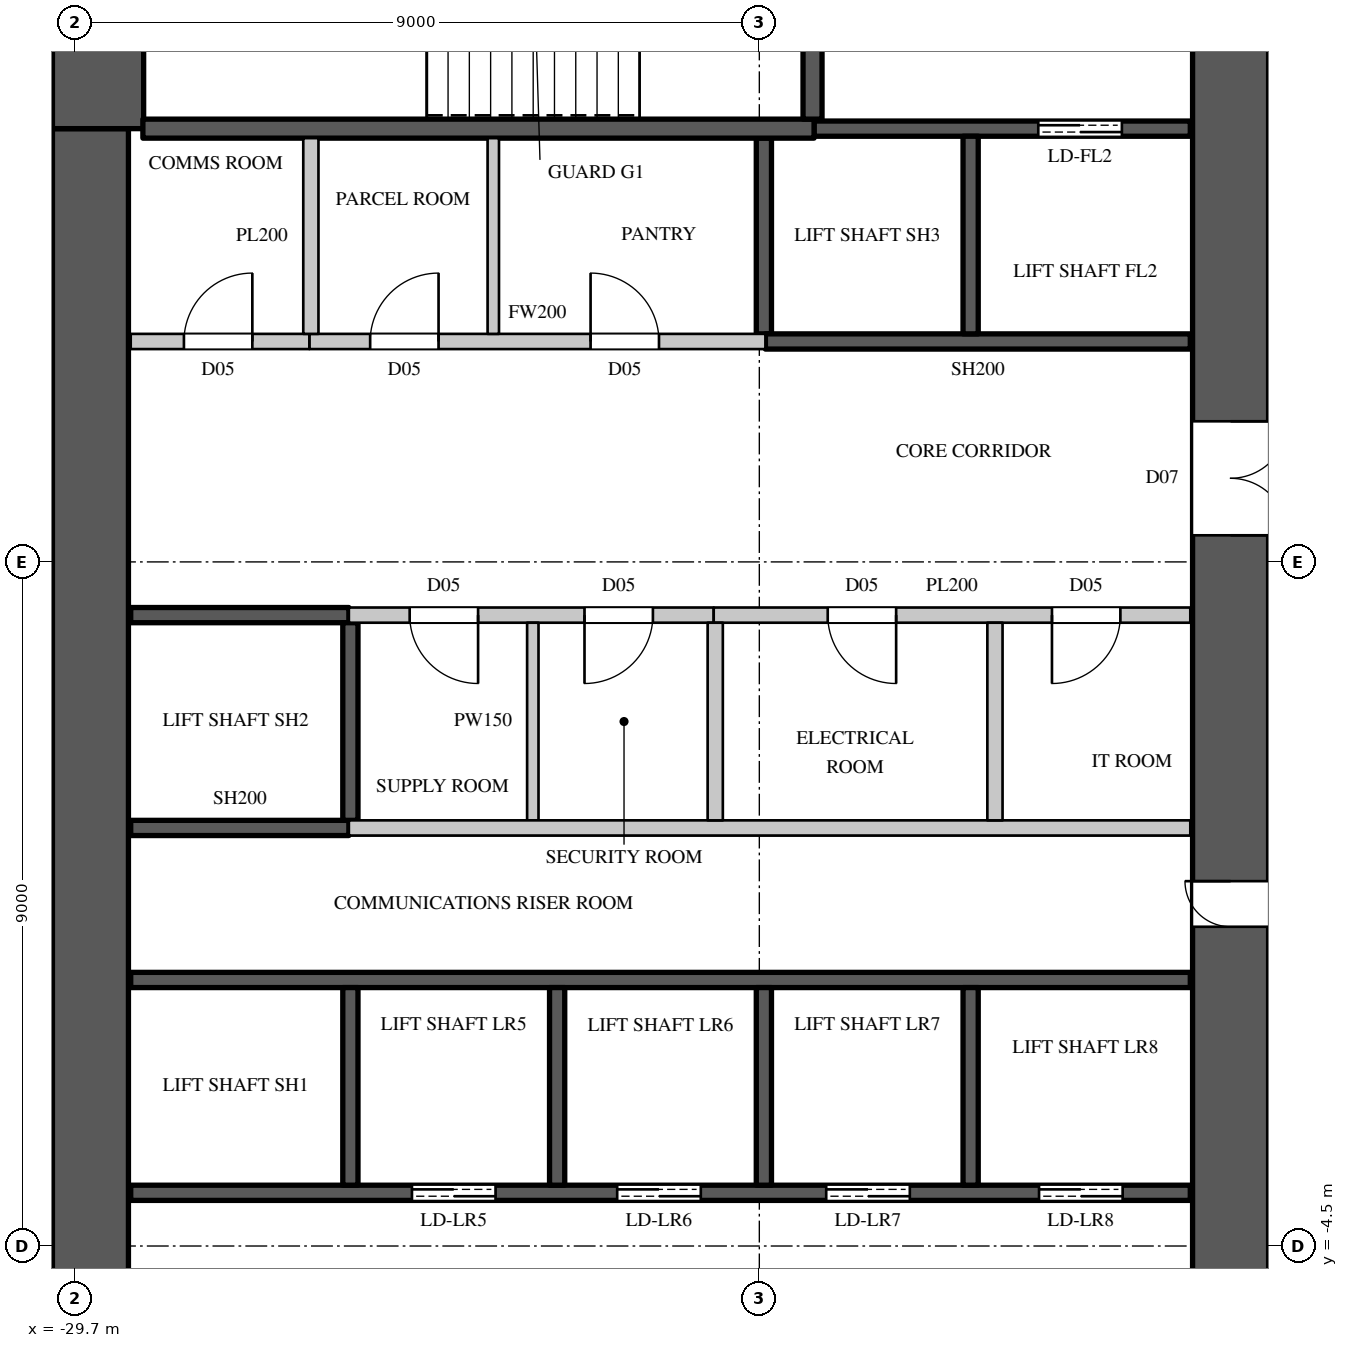
"""IFC4 building model, lengths in metres.
Left out: names, types, materials, properties, quantities, classifications, styles, units other than length and angle.
Written with IfcOpenShell. Run it as: python <this file> out.ifc"""

import sys

from ifc_helpers import new_model, si_unit, direction, frame, frame_2d, origin, place, context, subcontext, project, spatial, rectangle, extrude, element, fill, save


model = new_model("IFC4")
c1 = context("Model", 3, precision=1e-05, world=origin(), true_north=direction((0.0, 1.0)))
c2 = subcontext(c1, "Body", "Model", "MODEL_VIEW")
j1 = project(units=[si_unit("LENGTHUNIT", "METRE"), si_unit("PLANEANGLEUNIT", "RADIAN")], contexts=[c1])
p1 = place(None, origin())
s1 = spatial("IfcSite", under=j1, at=p1, CompositionType="ELEMENT")
p2 = place(p1, origin())
s2 = spatial("IfcBuilding", under=s1, at=p2, CompositionType="ELEMENT")
p3 = place(p2, frame((0.0, 0.0, 120.3)))
s3 = spatial("IfcBuildingStorey", under=s2, at=p3, CompositionType="ELEMENT", Elevation=120.3)
p4 = place(p3, frame((-14.5, -14.8, 0.0), z_axis=(0.0, 0.0, 1.0), x_axis=(0.0, 1.0, 0.0)))
e1 = element("IfcWall", 1, at=p4, inside=s3, PredefinedType="SHEAR", context=c2, shape_type="SweptSolid", body=[
    extrude(rectangle(XDim=29.6, YDim=1.0, at=frame_2d((14.8, 0.0))), origin(), (0.0, 0.0, 1.0), 3.6),
])
p5 = place(p4, frame((8.45, 0.0, 0.0)))
e2 = element("IfcOpeningElement", 2, at=p5, cuts=e1, PredefinedType="OPENING", context=c2, shape_type="SweptSolid", body=[
    extrude(rectangle(XDim=1.5, YDim=2.4, at=frame_2d((0.75, 1.2))), frame((0.0, 0.51, 0.0), z_axis=(0.0, -1.0, 0.0), x_axis=(1.0, 0.0, 0.0)), (0.0, 0.0, 1.0), 1.02),
])
p6 = place(p4, frame((19.65, 0.0, 0.0)))
e3 = element("IfcOpeningElement", 3, at=p6, cuts=e1, PredefinedType="OPENING", context=c2, shape_type="SweptSolid", body=[
    extrude(rectangle(XDim=1.5, YDim=2.4, at=frame_2d((0.75, 1.2))), frame((0.0, 0.51, 0.0), z_axis=(0.0, -1.0, 0.0), x_axis=(1.0, 0.0, 0.0)), (0.0, 0.0, 1.0), 1.02),
])
p7 = place(p4, frame((14.5, 0.0, 0.0)))
e4 = element("IfcOpeningElement", 4, at=p7, cuts=e1, PredefinedType="OPENING", context=c2, shape_type="SweptSolid", body=[
    extrude(rectangle(XDim=0.6, YDim=2.0, at=frame_2d((0.3, 1.0))), frame((0.0, 0.51, 0.0), z_axis=(0.0, -1.0, 0.0), x_axis=(1.0, 0.0, 0.0)), (0.0, 0.0, 1.0), 1.02),
])
p8 = place(p3, frame((-29.5, -10.2, 0.0), z_axis=(0.0, 0.0, 1.0), x_axis=(0.0, 1.0, 0.0)))
e5 = element("IfcWall", 5, at=p8, inside=s3, PredefinedType="SHEAR", context=c2, shape_type="SweptSolid", body=[
    extrude(rectangle(XDim=20.4, YDim=1.0, at=frame_2d((10.2, 0.0))), origin(), (0.0, 0.0, 1.0), 3.6),
])
p9 = place(p3, frame((-29.4, 10.2, 0.0), z_axis=(0.0, 0.0, 1.0), x_axis=(0.0, 1.0, 0.0)))
e6 = element("IfcWall", 6, at=p9, inside=s3, PredefinedType="SHEAR", context=c2, shape_type="SweptSolid", body=[
    extrude(rectangle(XDim=4.6, YDim=1.2, at=frame_2d((2.3, 0.0))), origin(), (0.0, 0.0, 1.0), 3.6),
])
p10 = place(p3, frame((-26.62, 7.4, 0.0), z_axis=(0.0, 0.0, 1.0), x_axis=(1.0, 0.0, 0.0)))
e7 = element("IfcWall", 7, at=p10, inside=s3, PredefinedType="PARTITIONING", context=c2, shape_type="SweptSolid", body=[
    extrude(rectangle(XDim=6.0, YDim=0.2, at=frame_2d((3.0, 0.0))), origin(), (0.0, 0.0, 1.0), 3.3),
])
p11 = place(p10, frame((0.8, 0.0, 0.0)))
e8 = element("IfcOpeningElement", 8, at=p11, cuts=e7, PredefinedType="OPENING", context=c2, shape_type="SweptSolid", body=[
    extrude(rectangle(XDim=0.9, YDim=2.2, at=frame_2d((0.45, 1.1))), frame((0.0, 0.11, 0.0), z_axis=(0.0, -1.0, 0.0), x_axis=(1.0, 0.0, 0.0)), (0.0, 0.0, 1.0), 0.22),
])
p12 = place(p10, frame((3.7, 0.0, 0.0)))
e9 = element("IfcOpeningElement", 9, at=p12, cuts=e7, PredefinedType="OPENING", context=c2, shape_type="SweptSolid", body=[
    extrude(rectangle(XDim=0.9, YDim=2.2, at=frame_2d((0.45, 1.1))), frame((0.0, 0.11, 0.0), z_axis=(0.0, -1.0, 0.0), x_axis=(1.0, 0.0, 0.0)), (0.0, 0.0, 1.0), 0.22),
])
p13 = place(p3, frame((-26.1, 3.8, 0.0), z_axis=(0.0, 0.0, 1.0), x_axis=(1.0, 0.0, 0.0)))
e10 = element("IfcWall", 10, at=p13, inside=s3, PredefinedType="PARTITIONING", context=c2, shape_type="SweptSolid", body=[
    extrude(rectangle(XDim=4.8, YDim=0.2, at=frame_2d((2.4, 0.0))), origin(), (0.0, 0.0, 1.0), 3.3),
])
p14 = place(p13, frame((0.8, 0.0, 0.0)))
e11 = element("IfcOpeningElement", 11, at=p14, cuts=e10, PredefinedType="OPENING", context=c2, shape_type="SweptSolid", body=[
    extrude(rectangle(XDim=0.9, YDim=2.2, at=frame_2d((0.45, 1.1))), frame((0.0, 0.11, 0.0), z_axis=(0.0, -1.0, 0.0), x_axis=(1.0, 0.0, 0.0)), (0.0, 0.0, 1.0), 0.22),
])
p15 = place(p13, frame((3.1, 0.0, 0.0)))
e12 = element("IfcOpeningElement", 12, at=p15, cuts=e10, PredefinedType="OPENING", context=c2, shape_type="SweptSolid", body=[
    extrude(rectangle(XDim=0.9, YDim=2.2, at=frame_2d((0.45, 1.1))), frame((0.0, 0.11, 0.0), z_axis=(0.0, -1.0, 0.0), x_axis=(1.0, 0.0, 0.0)), (0.0, 0.0, 1.0), 0.22),
])
p16 = place(p3, frame((-24.2, 7.5, 0.0), z_axis=(0.0, 0.0, 1.0), x_axis=(0.0, 1.0, 0.0)))
e13 = element("IfcWall", 13, at=p16, inside=s3, PredefinedType="PARTITIONING", context=c2, shape_type="SweptSolid", body=[
    extrude(rectangle(XDim=2.575, YDim=0.15, at=frame_2d((1.288, 0.0))), origin(), (0.0, 0.0, 1.0), 3.3),
])
p17 = place(p3, frame((-23.68, 1.1, 0.0), z_axis=(0.0, 0.0, 1.0), x_axis=(0.0, 1.0, 0.0)))
e14 = element("IfcWall", 14, at=p17, inside=s3, PredefinedType="PARTITIONING", context=c2, shape_type="SweptSolid", body=[
    extrude(rectangle(XDim=2.6, YDim=0.15, at=frame_2d((1.3, 0.0))), origin(), (0.0, 0.0, 1.0), 3.3),
])
p18 = place(p3, frame((-28.97, 7.4, 0.0), z_axis=(0.0, 0.0, 1.0), x_axis=(1.0, 0.0, 0.0)))
e15 = element("IfcWall", 15, at=p18, inside=s3, PredefinedType="PARTITIONING", context=c2, shape_type="SweptSolid", body=[
    extrude(rectangle(XDim=2.35, YDim=0.2, at=frame_2d((1.175, 0.0))), origin(), (0.0, 0.0, 1.0), 3.3),
])
p19 = place(p18, frame((0.7, 0.0, 0.0)))
e16 = element("IfcOpeningElement", 16, at=p19, cuts=e15, PredefinedType="OPENING", context=c2, shape_type="SweptSolid", body=[
    extrude(rectangle(XDim=0.9, YDim=2.2, at=frame_2d((0.45, 1.1))), frame((0.0, 0.11, 0.0), z_axis=(0.0, -1.0, 0.0), x_axis=(1.0, 0.0, 0.0)), (0.0, 0.0, 1.0), 0.22),
])
p20 = place(p3, frame((-26.6, 7.5, 0.0), z_axis=(0.0, 0.0, 1.0), x_axis=(0.0, 1.0, 0.0)))
e17 = element("IfcWall", 17, at=p20, inside=s3, PredefinedType="PARTITIONING", context=c2, shape_type="SweptSolid", body=[
    extrude(rectangle(XDim=2.575, YDim=0.2, at=frame_2d((1.288, 0.0))), origin(), (0.0, 0.0, 1.0), 3.3),
])
p21 = place(p3, frame((-26.1, 1.0, 0.0), z_axis=(0.0, 0.0, 1.0), x_axis=(1.0, 0.0, 0.0)))
e18 = element("IfcWall", 18, at=p21, inside=s3, PredefinedType="PARTITIONING", context=c2, shape_type="SweptSolid", body=[
    extrude(rectangle(XDim=11.07, YDim=0.2, at=frame_2d((5.535, 0.0))), origin(), (0.0, 0.0, 1.0), 3.3),
])
p22 = place(p3, frame((-21.3, 3.8, 0.0), z_axis=(0.0, 0.0, 1.0), x_axis=(1.0, 0.0, 0.0)))
e19 = element("IfcWall", 19, at=p22, inside=s3, PredefinedType="PARTITIONING", context=c2, shape_type="SweptSolid", body=[
    extrude(rectangle(XDim=6.27, YDim=0.2, at=frame_2d((3.135, 0.0))), origin(), (0.0, 0.0, 1.0), 3.3),
])
p23 = place(p22, frame((1.5, 0.0, 0.0)))
e20 = element("IfcOpeningElement", 20, at=p23, cuts=e19, PredefinedType="OPENING", context=c2, shape_type="SweptSolid", body=[
    extrude(rectangle(XDim=0.9, YDim=2.2, at=frame_2d((0.45, 1.1))), frame((0.0, 0.11, 0.0), z_axis=(0.0, -1.0, 0.0), x_axis=(1.0, 0.0, 0.0)), (0.0, 0.0, 1.0), 0.22),
])
p24 = place(p22, frame((4.45, 0.0, 0.0)))
e21 = element("IfcOpeningElement", 21, at=p24, cuts=e19, PredefinedType="OPENING", context=c2, shape_type="SweptSolid", body=[
    extrude(rectangle(XDim=0.9, YDim=2.2, at=frame_2d((0.45, 1.1))), frame((0.0, 0.11, 0.0), z_axis=(0.0, -1.0, 0.0), x_axis=(1.0, 0.0, 0.0)), (0.0, 0.0, 1.0), 0.22),
])
for number, where, z_axis, x_axis in (
    (22, (-21.28, 1.1, 0.0), (0.0, 0.0, 1.0), (0.0, 1.0, 0.0)),
    (23, (-17.6, 1.1, 0.0), (0.0, 0.0, 1.0), (0.0, 1.0, 0.0)),
):
    element("IfcWall", number, at=place(p3, frame(where, z_axis=z_axis, x_axis=x_axis)), inside=s3, PredefinedType="PARTITIONING", context=c2, shape_type="SweptSolid", body=[
        extrude(rectangle(XDim=2.6, YDim=0.2, at=frame_2d((1.3, 0.0))), origin(), (0.0, 0.0, 1.0), 3.3),
    ])
p25 = place(p3, frame((-28.97, -3.8, 0.0), z_axis=(0.0, 0.0, 1.0), x_axis=(1.0, 0.0, 0.0)))
e24 = element("IfcWall", 24, at=p25, inside=s3, PredefinedType="SHEAR", context=c2, shape_type="SweptSolid", body=[
    extrude(rectangle(XDim=13.94, YDim=0.2, at=frame_2d((6.97, 0.0))), origin(), (0.0, 0.0, 1.0), 3.3),
])
p26 = place(p25, frame((3.7, 0.0, 0.0)))
e25 = element("IfcOpeningElement", 25, at=p26, cuts=e24, PredefinedType="OPENING", context=c2, shape_type="SweptSolid", body=[
    extrude(rectangle(XDim=1.1, YDim=2.2, at=frame_2d((0.55, 1.1))), frame((0.0, 0.11, 0.0), z_axis=(0.0, -1.0, 0.0), x_axis=(1.0, 0.0, 0.0)), (0.0, 0.0, 1.0), 0.22),
])
p27 = place(p25, frame((6.4, 0.0, 0.0)))
e26 = element("IfcOpeningElement", 26, at=p27, cuts=e24, PredefinedType="OPENING", context=c2, shape_type="SweptSolid", body=[
    extrude(rectangle(XDim=1.1, YDim=2.2, at=frame_2d((0.55, 1.1))), frame((0.0, 0.11, 0.0), z_axis=(0.0, -1.0, 0.0), x_axis=(1.0, 0.0, 0.0)), (0.0, 0.0, 1.0), 0.22),
])
p28 = place(p25, frame((9.15, 0.0, 0.0)))
e27 = element("IfcOpeningElement", 27, at=p28, cuts=e24, PredefinedType="OPENING", context=c2, shape_type="SweptSolid", body=[
    extrude(rectangle(XDim=1.1, YDim=2.2, at=frame_2d((0.55, 1.1))), frame((0.0, 0.11, 0.0), z_axis=(0.0, -1.0, 0.0), x_axis=(1.0, 0.0, 0.0)), (0.0, 0.0, 1.0), 0.22),
])
p29 = place(p25, frame((11.95, 0.0, 0.0)))
e28 = element("IfcOpeningElement", 28, at=p29, cuts=e24, PredefinedType="OPENING", context=c2, shape_type="SweptSolid", body=[
    extrude(rectangle(XDim=1.1, YDim=2.2, at=frame_2d((0.55, 1.1))), frame((0.0, 0.11, 0.0), z_axis=(0.0, -1.0, 0.0), x_axis=(1.0, 0.0, 0.0)), (0.0, 0.0, 1.0), 0.22),
])
p30 = place(p3, frame((-28.97, -1.0, 0.0), z_axis=(0.0, 0.0, 1.0), x_axis=(1.0, 0.0, 0.0)))
e29 = element("IfcWall", 29, at=p30, inside=s3, PredefinedType="SHEAR", context=c2, shape_type="SweptSolid", body=[
    extrude(rectangle(XDim=13.94, YDim=0.2, at=frame_2d((6.97, 0.0))), origin(), (0.0, 0.0, 1.0), 3.3),
])
for number, where, z_axis, x_axis in (
    (30, (-28.97, 1.0, 0.0), (0.0, 0.0, 1.0), (1.0, 0.0, 0.0)),
    (31, (-28.97, 3.8, 0.0), (0.0, 0.0, 1.0), (1.0, 0.0, 0.0)),
):
    element("IfcWall", number, at=place(p3, frame(where, z_axis=z_axis, x_axis=x_axis)), inside=s3, PredefinedType="SHEAR", context=c2, shape_type="SweptSolid", body=[
        extrude(rectangle(XDim=2.87, YDim=0.2, at=frame_2d((1.435, 0.0))), origin(), (0.0, 0.0, 1.0), 3.3),
    ])
p31 = place(p3, frame((-26.08, -3.7, 0.0), z_axis=(0.0, 0.0, 1.0), x_axis=(0.0, 1.0, 0.0)))
e32 = element("IfcWall", 32, at=p31, inside=s3, PredefinedType="SHEAR", context=c2, shape_type="SweptSolid", body=[
    extrude(rectangle(XDim=2.6, YDim=0.2, at=frame_2d((1.3, 0.0))), origin(), (0.0, 0.0, 1.0), 3.6),
])
p32 = place(p3, frame((-26.08, 1.1, 0.0), z_axis=(0.0, 0.0, 1.0), x_axis=(0.0, 1.0, 0.0)))
e33 = element("IfcWall", 33, at=p32, inside=s3, PredefinedType="SHEAR", context=c2, shape_type="SweptSolid", body=[
    extrude(rectangle(XDim=2.6, YDim=0.2, at=frame_2d((1.3, 0.0))), origin(), (0.0, 0.0, 1.0), 3.3),
])
for number, where, z_axis, x_axis in (
    (34, (-23.36, -3.7, 0.0), (0.0, 0.0, 1.0), (0.0, 1.0, 0.0)),
    (35, (-20.64, -3.7, 0.0), (0.0, 0.0, 1.0), (0.0, 1.0, 0.0)),
):
    element("IfcWall", number, at=place(p3, frame(where, z_axis=z_axis, x_axis=x_axis)), inside=s3, PredefinedType="SHEAR", context=c2, shape_type="SweptSolid", body=[
        extrude(rectangle(XDim=2.6, YDim=0.2, at=frame_2d((1.3, 0.0))), origin(), (0.0, 0.0, 1.0), 3.6),
    ])
p33 = place(p3, frame((-20.64, 7.5, 0.0), z_axis=(0.0, 0.0, 1.0), x_axis=(0.0, 1.0, 0.0)))
e36 = element("IfcWall", 36, at=p33, inside=s3, PredefinedType="SHEAR", context=c2, shape_type="SweptSolid", body=[
    extrude(rectangle(XDim=2.575, YDim=0.2, at=frame_2d((1.288, 0.0))), origin(), (0.0, 0.0, 1.0), 3.3),
])
p34 = place(p3, frame((-20.62, 7.4, 0.0), z_axis=(0.0, 0.0, 1.0), x_axis=(1.0, 0.0, 0.0)))
e37 = element("IfcWall", 37, at=p34, inside=s3, PredefinedType="SHEAR", context=c2, shape_type="SweptSolid", body=[
    extrude(rectangle(XDim=5.59, YDim=0.2, at=frame_2d((2.795, 0.0))), origin(), (0.0, 0.0, 1.0), 3.3),
])
p35 = place(p3, frame((-19.98, 10.2, 0.0), z_axis=(0.0, 0.0, 1.0), x_axis=(1.0, 0.0, 0.0)))
e38 = element("IfcWall", 38, at=p35, inside=s3, PredefinedType="SHEAR", context=c2, shape_type="SweptSolid", body=[
    extrude(rectangle(XDim=4.95, YDim=0.2, at=frame_2d((2.475, 0.0))), origin(), (0.0, 0.0, 1.0), 3.3),
])
p36 = place(p35, frame((2.95, 0.0, 0.0)))
e39 = element("IfcOpeningElement", 39, at=p36, cuts=e38, PredefinedType="OPENING", context=c2, shape_type="SweptSolid", body=[
    extrude(rectangle(XDim=1.1, YDim=2.2, at=frame_2d((0.55, 1.1))), frame((0.0, 0.11, 0.0), z_axis=(0.0, -1.0, 0.0), x_axis=(1.0, 0.0, 0.0)), (0.0, 0.0, 1.0), 0.22),
])
p37 = place(p3, frame((-17.92, -3.7, 0.0), z_axis=(0.0, 0.0, 1.0), x_axis=(0.0, 1.0, 0.0)))
e40 = element("IfcWall", 40, at=p37, inside=s3, PredefinedType="SHEAR", context=c2, shape_type="SweptSolid", body=[
    extrude(rectangle(XDim=2.6, YDim=0.2, at=frame_2d((1.3, 0.0))), origin(), (0.0, 0.0, 1.0), 3.6),
])
p38 = place(p3, frame((-17.92, 7.5, 0.0), z_axis=(0.0, 0.0, 1.0), x_axis=(0.0, 1.0, 0.0)))
e41 = element("IfcWall", 41, at=p38, inside=s3, PredefinedType="SHEAR", context=c2, shape_type="SweptSolid", body=[
    extrude(rectangle(XDim=2.6, YDim=0.2, at=frame_2d((1.3, 0.0))), origin(), (0.0, 0.0, 1.0), 3.6),
])
p39 = place(p3, frame((-28.81, 10.2, 0.0), z_axis=(0.0, 0.0, 1.0), x_axis=(1.0, 0.0, 0.0)))
e42 = element("IfcWall", 42, at=p39, inside=s3, PredefinedType="SHEAR", context=c2, shape_type="SweptSolid", body=[
    extrude(rectangle(XDim=8.83, YDim=0.25, at=frame_2d((4.415, 0.0))), origin(), (0.0, 0.0, 1.0), 3.3),
])
p40 = place(p3, frame((-20.0, 10.325, 0.0), z_axis=(0.0, 0.0, 1.0), x_axis=(0.0, 1.0, 0.0)))
e43 = element("IfcWall", 43, at=p40, inside=s3, PredefinedType="SHEAR", context=c2, shape_type="SweptSolid", body=[
    extrude(rectangle(XDim=4.445, YDim=0.25, at=frame_2d((2.223, 0.0))), origin(), (0.0, 0.0, 1.0), 3.3),
])
p41 = place(p40, frame((1.65, 0.0, 0.0)))
e44 = element("IfcOpeningElement", 44, at=p41, cuts=e43, PredefinedType="OPENING", context=c2, shape_type="SweptSolid", body=[
    extrude(rectangle(XDim=1.1, YDim=2.2, at=frame_2d((0.55, 1.1))), frame((0.0, 0.135, 0.0), z_axis=(0.0, -1.0, 0.0), x_axis=(1.0, 0.0, 0.0)), (0.0, 0.0, 1.0), 0.27),
])
p42 = place(p14, origin())
e45 = element("IfcDoor", 45, at=p42, inside=s3, OperationType="SINGLE_SWING_LEFT", PredefinedType="DOOR", context=c2, shape_type="SweptSolid", body=[
    extrude(rectangle(XDim=0.9, YDim=2.2, at=frame_2d((0.45, 1.1))), frame((0.0, 0.025, 0.0), z_axis=(0.0, -1.0, 0.0), x_axis=(1.0, 0.0, 0.0)), (0.0, 0.0, 1.0), 0.05),
])
fill(e11, e45)
p43 = place(p15, origin())
e46 = element("IfcDoor", 46, at=p43, inside=s3, OperationType="SINGLE_SWING_RIGHT", PredefinedType="DOOR", context=c2, shape_type="SweptSolid", body=[
    extrude(rectangle(XDim=0.9, YDim=2.2, at=frame_2d((0.45, 1.1))), frame((0.0, 0.025, 0.0), z_axis=(0.0, -1.0, 0.0), x_axis=(1.0, 0.0, 0.0)), (0.0, 0.0, 1.0), 0.05),
])
fill(e12, e46)
p44 = place(p23, origin())
e47 = element("IfcDoor", 47, at=p44, inside=s3, OperationType="SINGLE_SWING_LEFT", PredefinedType="DOOR", context=c2, shape_type="SweptSolid", body=[
    extrude(rectangle(XDim=0.9, YDim=2.2, at=frame_2d((0.45, 1.1))), frame((0.0, 0.025, 0.0), z_axis=(0.0, -1.0, 0.0), x_axis=(1.0, 0.0, 0.0)), (0.0, 0.0, 1.0), 0.05),
])
fill(e20, e47)
p45 = place(p24, origin())
e48 = element("IfcDoor", 48, at=p45, inside=s3, OperationType="SINGLE_SWING_RIGHT", PredefinedType="DOOR", context=c2, shape_type="SweptSolid", body=[
    extrude(rectangle(XDim=0.9, YDim=2.2, at=frame_2d((0.45, 1.1))), frame((0.0, 0.025, 0.0), z_axis=(0.0, -1.0, 0.0), x_axis=(1.0, 0.0, 0.0)), (0.0, 0.0, 1.0), 0.05),
])
fill(e21, e48)
p46 = place(p19, origin())
e49 = element("IfcDoor", 49, at=p46, inside=s3, OperationType="SINGLE_SWING_RIGHT", PredefinedType="DOOR", context=c2, shape_type="SweptSolid", body=[
    extrude(rectangle(XDim=0.9, YDim=2.2, at=frame_2d((0.45, 1.1))), frame((0.0, 0.025, 0.0), z_axis=(0.0, -1.0, 0.0), x_axis=(1.0, 0.0, 0.0)), (0.0, 0.0, 1.0), 0.05),
])
fill(e16, e49)
p47 = place(p11, origin())
e50 = element("IfcDoor", 50, at=p47, inside=s3, OperationType="SINGLE_SWING_RIGHT", PredefinedType="DOOR", context=c2, shape_type="SweptSolid", body=[
    extrude(rectangle(XDim=0.9, YDim=2.2, at=frame_2d((0.45, 1.1))), frame((0.0, 0.025, 0.0), z_axis=(0.0, -1.0, 0.0), x_axis=(1.0, 0.0, 0.0)), (0.0, 0.0, 1.0), 0.05),
])
fill(e8, e50)
p48 = place(p12, origin())
e51 = element("IfcDoor", 51, at=p48, inside=s3, OperationType="SINGLE_SWING_LEFT", PredefinedType="DOOR", context=c2, shape_type="SweptSolid", body=[
    extrude(rectangle(XDim=0.9, YDim=2.2, at=frame_2d((0.45, 1.1))), frame((0.0, 0.025, 0.0), z_axis=(0.0, -1.0, 0.0), x_axis=(1.0, 0.0, 0.0)), (0.0, 0.0, 1.0), 0.05),
])
fill(e9, e51)
p49 = place(p26, origin())
e52 = element("IfcDoor", 52, at=p49, inside=s3, OperationType="DOUBLE_DOOR_SLIDING", PredefinedType="DOOR", context=c2, shape_type="SweptSolid", body=[
    extrude(rectangle(XDim=1.1, YDim=2.2, at=frame_2d((0.55, 1.1))), frame((0.0, 0.025, 0.0), z_axis=(0.0, -1.0, 0.0), x_axis=(1.0, 0.0, 0.0)), (0.0, 0.0, 1.0), 0.05),
])
fill(e25, e52)
p50 = place(p27, origin())
e53 = element("IfcDoor", 53, at=p50, inside=s3, OperationType="DOUBLE_DOOR_SLIDING", PredefinedType="DOOR", context=c2, shape_type="SweptSolid", body=[
    extrude(rectangle(XDim=1.1, YDim=2.2, at=frame_2d((0.55, 1.1))), frame((0.0, 0.025, 0.0), z_axis=(0.0, -1.0, 0.0), x_axis=(1.0, 0.0, 0.0)), (0.0, 0.0, 1.0), 0.05),
])
fill(e26, e53)
p51 = place(p28, origin())
e54 = element("IfcDoor", 54, at=p51, inside=s3, OperationType="DOUBLE_DOOR_SLIDING", PredefinedType="DOOR", context=c2, shape_type="SweptSolid", body=[
    extrude(rectangle(XDim=1.1, YDim=2.2, at=frame_2d((0.55, 1.1))), frame((0.0, 0.025, 0.0), z_axis=(0.0, -1.0, 0.0), x_axis=(1.0, 0.0, 0.0)), (0.0, 0.0, 1.0), 0.05),
])
fill(e27, e54)
p52 = place(p29, origin())
e55 = element("IfcDoor", 55, at=p52, inside=s3, OperationType="DOUBLE_DOOR_SLIDING", PredefinedType="DOOR", context=c2, shape_type="SweptSolid", body=[
    extrude(rectangle(XDim=1.1, YDim=2.2, at=frame_2d((0.55, 1.1))), frame((0.0, 0.025, 0.0), z_axis=(0.0, -1.0, 0.0), x_axis=(1.0, 0.0, 0.0)), (0.0, 0.0, 1.0), 0.05),
])
fill(e28, e55)
p53 = place(p36, origin())
e56 = element("IfcDoor", 56, at=p53, inside=s3, OperationType="DOUBLE_DOOR_SLIDING", PredefinedType="DOOR", context=c2, shape_type="SweptSolid", body=[
    extrude(rectangle(XDim=1.1, YDim=2.2, at=frame_2d((0.55, 1.1))), frame((0.0, 0.025, 0.0), z_axis=(0.0, -1.0, 0.0), x_axis=(1.0, 0.0, 0.0)), (0.0, 0.0, 1.0), 0.05),
])
fill(e39, e56)
p54 = place(p6, origin())
e57 = element("IfcDoor", 57, at=p54, inside=s3, OperationType="DOUBLE_DOOR_SINGLE_SWING", PredefinedType="DOOR", context=c2, shape_type="SweptSolid", body=[
    extrude(rectangle(XDim=1.5, YDim=2.4, at=frame_2d((0.75, 1.2))), frame((0.0, -0.445, 0.0), z_axis=(0.0, -1.0, 0.0), x_axis=(1.0, 0.0, 0.0)), (0.0, 0.0, 1.0), 0.05),
])
fill(e3, e57)
p55 = place(p7, origin())
e58 = element("IfcDoor", 58, at=p55, inside=s3, OperationType="SINGLE_SWING_RIGHT", PredefinedType="DOOR", context=c2, shape_type="SweptSolid", body=[
    extrude(rectangle(XDim=0.6, YDim=2.0, at=frame_2d((0.3, 1.0))), frame((0.0, 0.495, 0.0), z_axis=(0.0, -1.0, 0.0), x_axis=(1.0, 0.0, 0.0)), (0.0, 0.0, 1.0), 0.05),
])
fill(e4, e58)
save(model, sys.argv[1])
